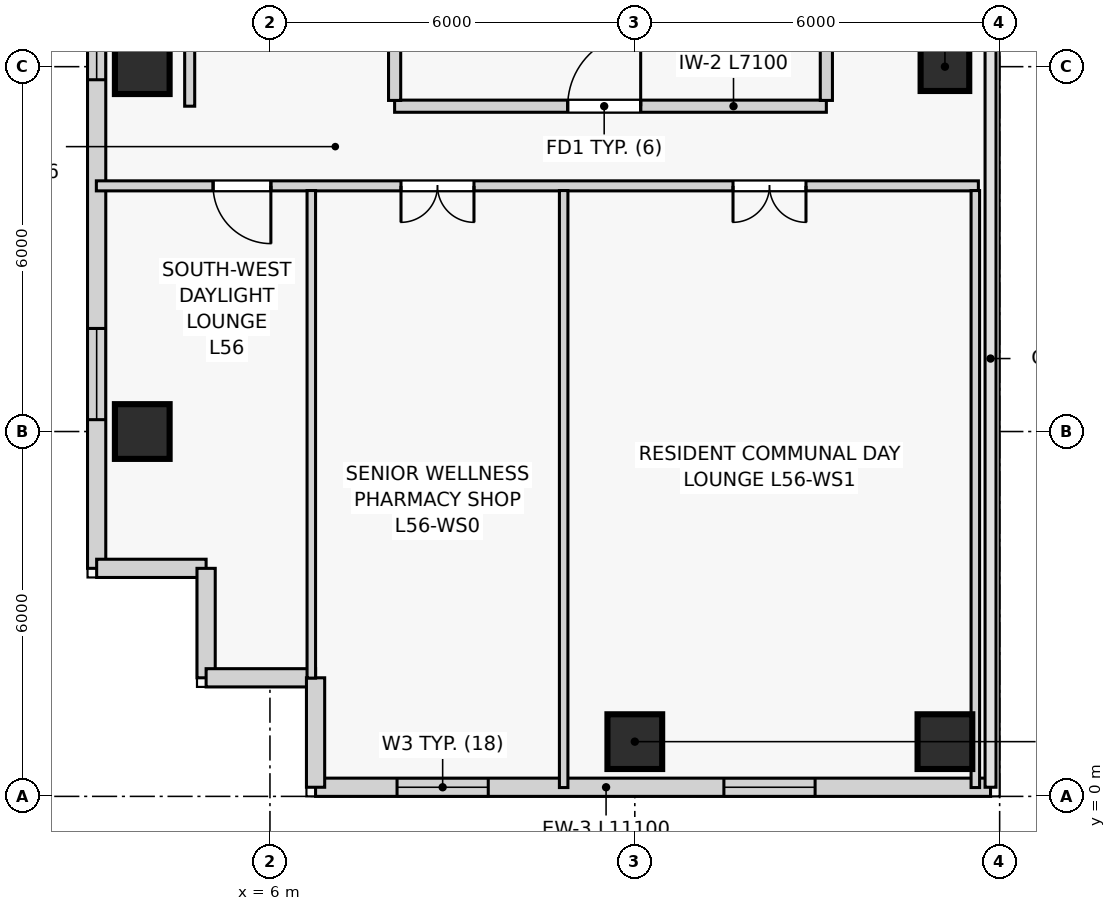
"""IFC4 building model, lengths in metres.
Left out: names, types, materials, properties, quantities, classifications, styles, units other than length and angle.
Written with IfcOpenShell. Run it as: python <this file> out.ifc"""

import sys

from ifc_helpers import new_model, si_unit, direction, frame, frame_2d, origin, origin_2d, place, context, subcontext, project, spatial, rectangle, extrude, source, transform, mapped, element, fill, save


model = new_model("IFC4")
c1 = context("Model", 3, precision=1e-05, world=origin(), true_north=direction((0.0, 1.0)))
c2 = subcontext(c1, "Body", "Model", "MODEL_VIEW")
j1 = project(units=[si_unit("LENGTHUNIT", "METRE"), si_unit("PLANEANGLEUNIT", "RADIAN")], contexts=[c1])
p1 = place(None, origin())
s1 = spatial("IfcSite", under=j1, at=p1, CompositionType="ELEMENT")
p2 = place(p1, origin())
s2 = spatial("IfcBuilding", under=s1, at=p2, CompositionType="ELEMENT")
p3 = place(p2, frame((0.0, 0.0, 213.3)))
s3 = spatial("IfcBuildingStorey", under=s2, at=p3, CompositionType="ELEMENT", Elevation=213.3)
m1 = source(origin(), c2, "Body", "SweptSolid", [
    extrude(rectangle(XDim=0.9, YDim=0.9, at=origin_2d()), origin(), (0.0, 0.0, 1.0), 3.6),
])
for number, where, z_axis, x_axis in (
    (1, (12.0, 0.9, 0.0), (0.0, 0.0, 1.0), (1.0, 0.0, 0.0)),
    (2, (17.1, 0.9, 0.0), (0.0, 0.0, 1.0), (1.0, 0.0, 0.0)),
    (3, (3.9, 6.0, 0.0), (0.0, 0.0, 1.0), (1.0, 0.0, 0.0)),
    (4, (3.9, 12.0, 0.0), (0.0, 0.0, 1.0), (1.0, 0.0, 0.0)),
):
    element("IfcColumn", number, at=place(p3, frame(where, z_axis=z_axis, x_axis=x_axis)), inside=s3, PredefinedType="COLUMN", context=c2, shape_type="MappedRepresentation", body=[
        mapped(m1, transform((0.0, 0.0, 0.0), scale=1.0)),
    ])
m2 = source(origin(), c2, "Body", "SweptSolid", [
    extrude(rectangle(XDim=0.8, YDim=0.8, at=origin_2d()), origin(), (0.0, 0.0, 1.0), 3.6),
])
p4 = place(p3, frame((17.1, 12.0, 0.0), z_axis=(0.0, 0.0, 1.0), x_axis=(1.0, 0.0, 0.0)))
e5 = element("IfcColumn", 5, at=p4, inside=s3, PredefinedType="COLUMN", context=c2, shape_type="MappedRepresentation", body=[
    mapped(m2, transform((0.0, 0.0, 0.0), scale=1.0)),
])
p5 = place(p3, frame((6.75, 0.15, 0.0), z_axis=(0.0, 0.0, 1.0), x_axis=(1.0, 0.0, 0.0)))
e6 = element("IfcWall", 6, at=p5, inside=s3, PredefinedType="SOLIDWALL", context=c2, shape_type="SweptSolid", body=[
    extrude(rectangle(XDim=11.1, YDim=0.3, at=frame_2d((5.55, 0.0))), origin(), (0.0, 0.0, 1.0), 2.95),
])
p6 = place(p5, frame((1.34, 0.0, 0.85)))
e7 = element("IfcOpeningElement", 7, at=p6, cuts=e6, PredefinedType="OPENING", context=c2, shape_type="SweptSolid", body=[
    extrude(rectangle(XDim=1.5, YDim=1.8, at=frame_2d((0.75, 0.9))), frame((0.0, 0.16, 0.0), z_axis=(0.0, -1.0, 0.0), x_axis=(1.0, 0.0, 0.0)), (0.0, 0.0, 1.0), 0.32),
])
p7 = place(p5, frame((6.715, 0.0, 0.85)))
e8 = element("IfcOpeningElement", 8, at=p7, cuts=e6, PredefinedType="OPENING", context=c2, shape_type="SweptSolid", body=[
    extrude(rectangle(XDim=1.5, YDim=1.8, at=frame_2d((0.75, 0.9))), frame((0.0, 0.16, 0.0), z_axis=(0.0, -1.0, 0.0), x_axis=(1.0, 0.0, 0.0)), (0.0, 0.0, 1.0), 0.32),
])
p8 = place(p3, frame((3.15, 19.6, 0.0), z_axis=(0.0, 0.0, 1.0), x_axis=(0.0, -1.0, 0.0)))
e9 = element("IfcWall", 9, at=p8, inside=s3, PredefinedType="SOLIDWALL", context=c2, shape_type="SweptSolid", body=[
    extrude(rectangle(XDim=15.85, YDim=0.3, at=frame_2d((7.925, 0.0))), origin(), (0.0, 0.0, 1.0), 2.95),
])
p9 = place(p8, frame((1.845, 0.0, 0.85)))
e10 = element("IfcOpeningElement", 10, at=p9, cuts=e9, PredefinedType="OPENING", context=c2, shape_type="SweptSolid", body=[
    extrude(rectangle(XDim=1.5, YDim=1.8, at=frame_2d((0.75, 0.9))), frame((0.0, 0.16, 0.0), z_axis=(0.0, -1.0, 0.0), x_axis=(1.0, 0.0, 0.0)), (0.0, 0.0, 1.0), 0.32),
])
p10 = place(p8, frame((6.315, 0.0, 0.85)))
e11 = element("IfcOpeningElement", 11, at=p10, cuts=e9, PredefinedType="OPENING", context=c2, shape_type="SweptSolid", body=[
    extrude(rectangle(XDim=1.5, YDim=1.8, at=frame_2d((0.75, 0.9))), frame((0.0, 0.16, 0.0), z_axis=(0.0, -1.0, 0.0), x_axis=(1.0, 0.0, 0.0)), (0.0, 0.0, 1.0), 0.32),
])
p11 = place(p8, frame((11.905, 0.0, 0.85)))
e12 = element("IfcOpeningElement", 12, at=p11, cuts=e9, PredefinedType="OPENING", context=c2, shape_type="SweptSolid", body=[
    extrude(rectangle(XDim=1.5, YDim=1.8, at=frame_2d((0.75, 0.9))), frame((0.0, 0.16, 0.0), z_axis=(0.0, -1.0, 0.0), x_axis=(1.0, 0.0, 0.0)), (0.0, 0.0, 1.0), 0.32),
])
for number, where, z_axis, x_axis in (
    (13, (3.15, 3.75, 0.0), (0.0, 0.0, 1.0), (1.0, 0.0, 0.0)),
    (14, (4.95, 3.75, 0.0), (0.0, 0.0, 1.0), (0.0, -1.0, 0.0)),
    (15, (4.95, 1.95, 0.0), (0.0, 0.0, 1.0), (1.0, 0.0, 0.0)),
    (16, (6.75, 1.95, 0.0), (0.0, 0.0, 1.0), (0.0, -1.0, 0.0)),
):
    element("IfcWall", number, at=place(p3, frame(where, z_axis=z_axis, x_axis=x_axis)), inside=s3, PredefinedType="SOLIDWALL", context=c2, shape_type="SweptSolid", body=[
        extrude(rectangle(XDim=1.8, YDim=0.3, at=frame_2d((0.9, 0.0))), origin(), (0.0, 0.0, 1.0), 2.95),
    ])
p12 = place(p3, frame((8.05, 11.35, 0.0), z_axis=(0.0, 0.0, 1.0), x_axis=(1.0, 0.0, 0.0)))
e17 = element("IfcWall", 17, at=p12, inside=s3, PredefinedType="PARTITIONING", context=c2, shape_type="SweptSolid", body=[
    extrude(rectangle(XDim=7.1, YDim=0.2, at=frame_2d((3.55, 0.0))), origin(), (0.0, 0.0, 1.0), 2.95),
])
p13 = place(p12, frame((2.846, 0.0, 0.0)))
e18 = element("IfcOpeningElement", 18, at=p13, cuts=e17, PredefinedType="OPENING", context=c2, shape_type="SweptSolid", body=[
    extrude(rectangle(XDim=1.2, YDim=2.2, at=frame_2d((0.6, 1.1))), frame((0.0, 0.11, 0.0), z_axis=(0.0, -1.0, 0.0), x_axis=(1.0, 0.0, 0.0)), (0.0, 0.0, 1.0), 0.22),
])
for number, where, z_axis, x_axis in (
    (19, (8.05, 11.445, 0.0), (0.0, 0.0, 1.0), (0.0, 1.0, 0.0)),
    (20, (15.15, 11.445, 0.0), (0.0, 0.0, 1.0), (0.0, 1.0, 0.0)),
):
    element("IfcWall", number, at=place(p3, frame(where, z_axis=z_axis, x_axis=x_axis)), inside=s3, PredefinedType="PARTITIONING", context=c2, shape_type="SweptSolid", body=[
        extrude(rectangle(XDim=3.235, YDim=0.2, at=frame_2d((1.617, 0.0))), origin(), (0.0, 0.0, 1.0), 2.95),
    ])
p14 = place(p3, frame((3.145, 10.04, 0.0), z_axis=(0.0, 0.0, 1.0), x_axis=(1.0, 0.0, 0.0)))
e21 = element("IfcWall", 21, at=p14, inside=s3, PredefinedType="PARTITIONING", context=c2, shape_type="SweptSolid", body=[
    extrude(rectangle(XDim=14.505, YDim=0.165, at=frame_2d((7.252, 0.0))), origin(), (0.0, 0.0, 1.0), 2.95),
])
p15 = place(p14, frame((5.01, 0.0, 0.0)))
e22 = element("IfcOpeningElement", 22, at=p15, cuts=e21, PredefinedType="OPENING", context=c2, shape_type="SweptSolid", body=[
    extrude(rectangle(XDim=1.2, YDim=2.2, at=frame_2d((0.6, 1.1))), frame((0.0, 0.093, 0.0), z_axis=(0.0, -1.0, 0.0), x_axis=(1.0, 0.0, 0.0)), (0.0, 0.0, 1.0), 0.185),
])
p16 = place(p14, frame((10.47, 0.0, 0.0)))
e23 = element("IfcOpeningElement", 23, at=p16, cuts=e21, PredefinedType="OPENING", context=c2, shape_type="SweptSolid", body=[
    extrude(rectangle(XDim=1.2, YDim=2.2, at=frame_2d((0.6, 1.1))), frame((0.0, 0.093, 0.0), z_axis=(0.0, -1.0, 0.0), x_axis=(1.0, 0.0, 0.0)), (0.0, 0.0, 1.0), 0.185),
])
p17 = place(p14, frame((1.92, 0.0, 0.0)))
e24 = element("IfcOpeningElement", 24, at=p17, cuts=e21, PredefinedType="OPENING", context=c2, shape_type="SweptSolid", body=[
    extrude(rectangle(XDim=0.95, YDim=2.1, at=frame_2d((0.475, 1.05))), frame((0.0, 0.093, 0.0), z_axis=(0.0, -1.0, 0.0), x_axis=(1.0, 0.0, 0.0)), (0.0, 0.0, 1.0), 0.185),
])
p18 = place(p3, frame((4.68, 11.35, 0.0), z_axis=(0.0, 0.0, 1.0), x_axis=(0.0, 1.0, 0.0)))
e25 = element("IfcWall", 25, at=p18, inside=s3, PredefinedType="PARTITIONING", context=c2, shape_type="SweptSolid", body=[
    extrude(rectangle(XDim=19.15, YDim=0.165, at=frame_2d((9.575, 0.0))), origin(), (0.0, 0.0, 1.0), 2.95),
])
p19 = place(p18, frame((1.6, 0.0, 0.0)))
e26 = element("IfcOpeningElement", 26, at=p19, cuts=e25, PredefinedType="OPENING", context=c2, shape_type="SweptSolid", body=[
    extrude(rectangle(XDim=0.95, YDim=2.1, at=frame_2d((0.475, 1.05))), frame((0.0, 0.093, 0.0), z_axis=(0.0, -1.0, 0.0), x_axis=(1.0, 0.0, 0.0)), (0.0, 0.0, 1.0), 0.185),
])
p20 = place(p18, frame((16.5, 0.0, 0.0)))
e27 = element("IfcOpeningElement", 27, at=p20, cuts=e25, PredefinedType="OPENING", context=c2, shape_type="SweptSolid", body=[
    extrude(rectangle(XDim=0.95, YDim=2.1, at=frame_2d((0.475, 1.05))), frame((0.0, 0.093, 0.0), z_axis=(0.0, -1.0, 0.0), x_axis=(1.0, 0.0, 0.0)), (0.0, 0.0, 1.0), 0.185),
])
p21 = place(p3, frame((6.68, 1.945, 0.0), z_axis=(0.0, 0.0, 1.0), x_axis=(0.0, 1.0, 0.0)))
e28 = element("IfcWall", 28, at=p21, inside=s3, PredefinedType="PARTITIONING", context=c2, shape_type="SweptSolid", body=[
    extrude(rectangle(XDim=8.017, YDim=0.14, at=frame_2d((4.009, 0.0))), origin(), (0.0, 0.0, 1.0), 2.95),
])
for number, where, z_axis, x_axis in (
    (29, (10.83, 0.145, 0.0), (0.0, 0.0, 1.0), (0.0, 1.0, 0.0)),
    (30, (17.6, 0.145, 0.0), (0.0, 0.0, 1.0), (0.0, 1.0, 0.0)),
):
    element("IfcWall", number, at=place(p3, frame(where, z_axis=z_axis, x_axis=x_axis)), inside=s3, PredefinedType="PARTITIONING", context=c2, shape_type="SweptSolid", body=[
        extrude(rectangle(XDim=9.817, YDim=0.14, at=frame_2d((4.909, 0.0))), origin(), (0.0, 0.0, 1.0), 2.95),
    ])
m3 = source(origin(), c2, "Body", "SweptSolid", [
    extrude(rectangle(XDim=1.5, YDim=1.8, at=frame_2d((0.75, 0.9))), frame((0.0, 0.03, 0.0), z_axis=(0.0, -1.0, 0.0), x_axis=(1.0, 0.0, 0.0)), (0.0, 0.0, 1.0), 0.06),
])
p22 = place(p6, origin())
e31 = element("IfcWindow", 31, at=p22, inside=s3, PartitioningType="SINGLE_PANEL", PredefinedType="WINDOW", context=c2, shape_type="MappedRepresentation", body=[
    mapped(m3, transform((0.0, 0.0, 0.0), scale=1.0)),
])
fill(e7, e31)
p23 = place(p7, origin())
e32 = element("IfcWindow", 32, at=p23, inside=s3, PartitioningType="SINGLE_PANEL", PredefinedType="WINDOW", context=c2, shape_type="MappedRepresentation", body=[
    mapped(m3, transform((0.0, 0.0, 0.0), scale=1.0)),
])
fill(e8, e32)
p24 = place(p10, origin())
e33 = element("IfcWindow", 33, at=p24, inside=s3, PartitioningType="SINGLE_PANEL", PredefinedType="WINDOW", context=c2, shape_type="MappedRepresentation", body=[
    mapped(m3, transform((0.0, 0.0, 0.0), scale=1.0)),
])
fill(e11, e33)
p25 = place(p11, origin())
e34 = element("IfcWindow", 34, at=p25, inside=s3, PartitioningType="SINGLE_PANEL", PredefinedType="WINDOW", context=c2, shape_type="MappedRepresentation", body=[
    mapped(m3, transform((0.0, 0.0, 0.0), scale=1.0)),
])
fill(e12, e34)
m4 = source(origin(), c2, "Body", "SweptSolid", [
    extrude(rectangle(XDim=1.2, YDim=2.2, at=frame_2d((0.6, 1.1))), frame((0.0, 0.025, 0.0), z_axis=(0.0, -1.0, 0.0), x_axis=(1.0, 0.0, 0.0)), (0.0, 0.0, 1.0), 0.05),
])
p26 = place(p13, origin())
e35 = element("IfcDoor", 35, at=p26, inside=s3, OperationType="SINGLE_SWING_RIGHT", PredefinedType="DOOR", context=c2, shape_type="MappedRepresentation", body=[
    mapped(m4, transform((0.0, 0.0, 0.0), scale=1.0)),
])
fill(e18, e35)
p27 = place(p15, frame((1.2, 0.0, 0.0), z_axis=(0.0, 0.0, 1.0), x_axis=(-1.0, 0.0, 0.0)))
e36 = element("IfcDoor", 36, at=p27, inside=s3, OperationType="DOUBLE_DOOR_SINGLE_SWING", PredefinedType="DOOR", context=c2, shape_type="MappedRepresentation", body=[
    mapped(m4, transform((0.0, 0.0, 0.0), scale=1.0)),
])
fill(e22, e36)
p28 = place(p16, frame((1.2, 0.0, 0.0), z_axis=(0.0, 0.0, 1.0), x_axis=(-1.0, 0.0, 0.0)))
e37 = element("IfcDoor", 37, at=p28, inside=s3, OperationType="DOUBLE_DOOR_SINGLE_SWING", PredefinedType="DOOR", context=c2, shape_type="MappedRepresentation", body=[
    mapped(m4, transform((0.0, 0.0, 0.0), scale=1.0)),
])
fill(e23, e37)
m5 = source(origin(), c2, "Body", "SweptSolid", [
    extrude(rectangle(XDim=0.95, YDim=2.1, at=frame_2d((0.475, 1.05))), frame((0.0, 0.025, 0.0), z_axis=(0.0, -1.0, 0.0), x_axis=(1.0, 0.0, 0.0)), (0.0, 0.0, 1.0), 0.05),
])
p29 = place(p17, frame((0.95, 0.0, 0.0), z_axis=(0.0, 0.0, 1.0), x_axis=(-1.0, 0.0, 0.0)))
e38 = element("IfcDoor", 38, at=p29, inside=s3, OperationType="SINGLE_SWING_LEFT", PredefinedType="DOOR", context=c2, shape_type="MappedRepresentation", body=[
    mapped(m5, transform((0.0, 0.0, 0.0), scale=1.0)),
])
fill(e24, e38)
save(model, sys.argv[1])
